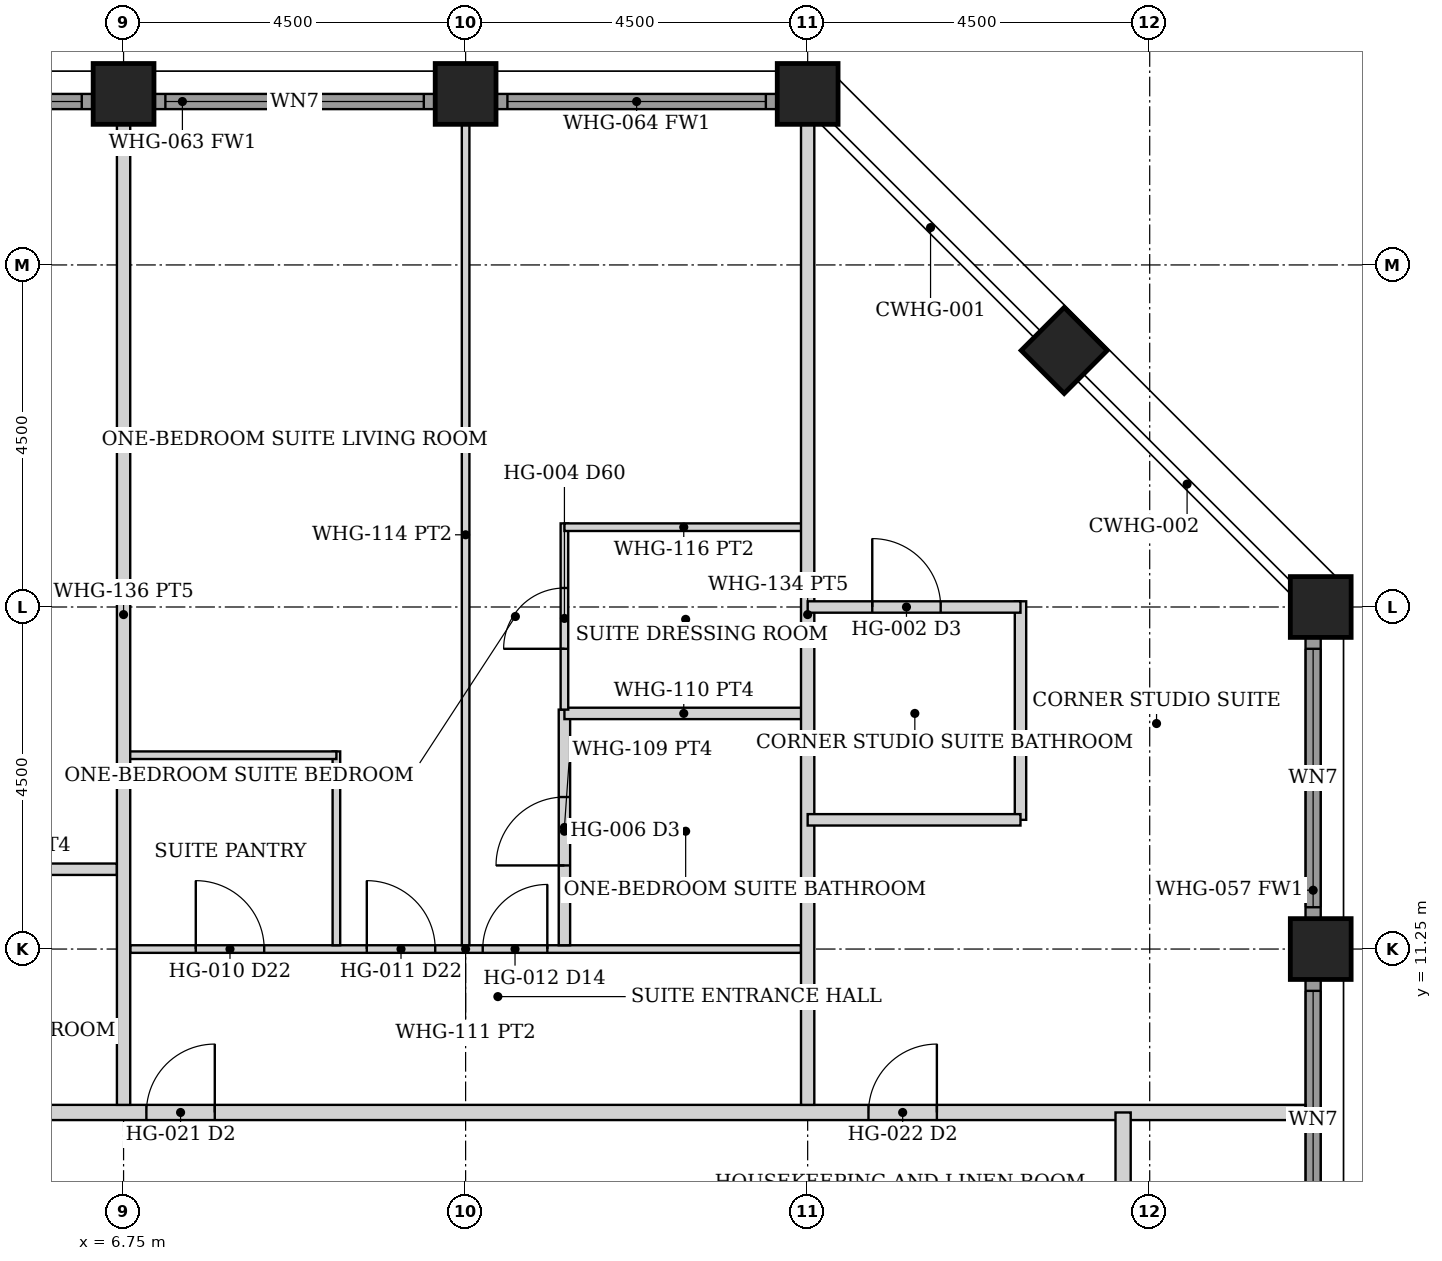
"""IFC4 building model, lengths in metres.
Left out: names, types, materials, properties, quantities, classifications, styles, units other than length and angle.
Written with IfcOpenShell. Run it as: python <this file> out.ifc"""

import sys

from ifc_helpers import new_model, si_unit, direction, frame, frame_2d, origin, origin_2d, place, context, subcontext, project, spatial, rectangle, hollow_rectangle, extrude, element, fill, save


model = new_model("IFC4")
c1 = context("Model", 3, precision=1e-05, world=origin(), true_north=direction((0.0, 1.0)))
c2 = subcontext(c1, "Body", "Model", "MODEL_VIEW")
j1 = project(units=[si_unit("LENGTHUNIT", "METRE"), si_unit("PLANEANGLEUNIT", "RADIAN")], contexts=[c1])
p1 = place(None, origin())
s1 = spatial("IfcSite", under=j1, at=p1, CompositionType="ELEMENT")
p2 = place(p1, origin())
s2 = spatial("IfcBuilding", under=s1, at=p2, CompositionType="ELEMENT")
p3 = place(p2, frame((0.0, 0.0, 186.8)))
s3 = spatial("IfcBuildingStorey", under=s2, at=p3, CompositionType="ELEMENT", Elevation=186.8)
for number, where, z_axis, x_axis in (
    (1, (6.75, 22.5, 0.0), (0.0, 0.0, 1.0), (0.0, 1.0, 0.0)),
    (2, (11.25, 22.5, 0.0), (0.0, 0.0, 1.0), (0.0, 1.0, 0.0)),
    (3, (22.5, 11.25, 0.0), (0.0, 0.0, 1.0), (1.0, 0.0, 0.0)),
    (4, (15.75, 22.5, 0.0), (0.0, 0.0, 1.0), (0.0, 1.0, 0.0)),
    (5, (22.5, 15.75, 0.0), (0.0, 0.0, 1.0), (1.0, 0.0, 0.0)),
    (6, (19.125, 19.125, 0.0), (0.0, 0.0, 1.0), (0.707, 0.707, 0.0)),
):
    element("IfcColumn", number, at=place(p3, frame(where, z_axis=z_axis, x_axis=x_axis)), inside=s3, PredefinedType="COLUMN", context=c2, shape_type="SweptSolid", body=[
        extrude(hollow_rectangle(XDim=0.8, YDim=0.8, WallThickness=0.045, at=origin_2d()), origin(), (0.0, 0.0, 1.0), 3.6),
    ])
p4 = place(p3, frame((22.4, 7.155, 0.0), z_axis=(0.0, 0.0, 1.0), x_axis=(0.0, 1.0, 0.0)))
e7 = element("IfcWall", 7, at=p4, inside=s3, PredefinedType="SOLIDWALL", context=c2, shape_type="SweptSolid", body=[
    extrude(rectangle(XDim=3.69, YDim=0.2, at=frame_2d((1.845, 0.0))), origin(), (0.0, 0.0, 1.0), 2.379),
])
p5 = place(p4, frame((0.145, 0.0, 0.3)))
e8 = element("IfcOpeningElement", 8, at=p5, cuts=e7, PredefinedType="OPENING", context=c2, shape_type="SweptSolid", body=[
    extrude(rectangle(XDim=3.4, YDim=1.929, at=frame_2d((1.7, 0.964))), frame((0.0, 0.11, 0.0), z_axis=(0.0, -1.0, 0.0), x_axis=(1.0, 0.0, 0.0)), (0.0, 0.0, 1.0), 0.22),
])
p6 = place(p3, frame((22.4, 11.655, 0.0), z_axis=(0.0, 0.0, 1.0), x_axis=(0.0, 1.0, 0.0)))
e9 = element("IfcWall", 9, at=p6, inside=s3, PredefinedType="SOLIDWALL", context=c2, shape_type="SweptSolid", body=[
    extrude(rectangle(XDim=3.69, YDim=0.2, at=frame_2d((1.845, 0.0))), origin(), (0.0, 0.0, 1.0), 2.379),
])
p7 = place(p6, frame((0.145, 0.0, 0.3)))
e10 = element("IfcOpeningElement", 10, at=p7, cuts=e9, PredefinedType="OPENING", context=c2, shape_type="SweptSolid", body=[
    extrude(rectangle(XDim=3.4, YDim=1.929, at=frame_2d((1.7, 0.964))), frame((0.0, 0.11, 0.0), z_axis=(0.0, -1.0, 0.0), x_axis=(1.0, 0.0, 0.0)), (0.0, 0.0, 1.0), 0.22),
])
p8 = place(p3, frame((2.655, 22.4, 0.0), z_axis=(0.0, 0.0, 1.0), x_axis=(1.0, 0.0, 0.0)))
e11 = element("IfcWall", 11, at=p8, inside=s3, PredefinedType="SOLIDWALL", context=c2, shape_type="SweptSolid", body=[
    extrude(rectangle(XDim=3.69, YDim=0.2, at=frame_2d((1.845, 0.0))), origin(), (0.0, 0.0, 1.0), 2.379),
])
p9 = place(p8, frame((0.145, 0.0, 0.3)))
e12 = element("IfcOpeningElement", 12, at=p9, cuts=e11, PredefinedType="OPENING", context=c2, shape_type="SweptSolid", body=[
    extrude(rectangle(XDim=3.4, YDim=1.929, at=frame_2d((1.7, 0.964))), frame((0.0, 0.11, 0.0), z_axis=(0.0, -1.0, 0.0), x_axis=(1.0, 0.0, 0.0)), (0.0, 0.0, 1.0), 0.22),
])
p10 = place(p3, frame((7.155, 22.4, 0.0), z_axis=(0.0, 0.0, 1.0), x_axis=(1.0, 0.0, 0.0)))
e13 = element("IfcWall", 13, at=p10, inside=s3, PredefinedType="SOLIDWALL", context=c2, shape_type="SweptSolid", body=[
    extrude(rectangle(XDim=3.69, YDim=0.2, at=frame_2d((1.845, 0.0))), origin(), (0.0, 0.0, 1.0), 2.379),
])
p11 = place(p10, frame((0.145, 0.0, 0.3)))
e14 = element("IfcOpeningElement", 14, at=p11, cuts=e13, PredefinedType="OPENING", context=c2, shape_type="SweptSolid", body=[
    extrude(rectangle(XDim=3.4, YDim=1.929, at=frame_2d((1.7, 0.964))), frame((0.0, 0.11, 0.0), z_axis=(0.0, -1.0, 0.0), x_axis=(1.0, 0.0, 0.0)), (0.0, 0.0, 1.0), 0.22),
])
p12 = place(p3, frame((11.655, 22.4, 0.0), z_axis=(0.0, 0.0, 1.0), x_axis=(1.0, 0.0, 0.0)))
e15 = element("IfcWall", 15, at=p12, inside=s3, PredefinedType="SOLIDWALL", context=c2, shape_type="SweptSolid", body=[
    extrude(rectangle(XDim=3.69, YDim=0.2, at=frame_2d((1.845, 0.0))), origin(), (0.0, 0.0, 1.0), 2.379),
])
p13 = place(p12, frame((0.145, 0.0, 0.3)))
e16 = element("IfcOpeningElement", 16, at=p13, cuts=e15, PredefinedType="OPENING", context=c2, shape_type="SweptSolid", body=[
    extrude(rectangle(XDim=3.4, YDim=1.929, at=frame_2d((1.7, 0.964))), frame((0.0, 0.11, 0.0), z_axis=(0.0, -1.0, 0.0), x_axis=(1.0, 0.0, 0.0)), (0.0, 0.0, 1.0), 0.22),
])
p14 = place(p3, frame((-22.3, 9.1, 0.0), z_axis=(0.0, 0.0, 1.0), x_axis=(1.0, 0.0, 0.0)))
e17 = element("IfcWall", 17, at=p14, inside=s3, PredefinedType="PARTITIONING", context=c2, shape_type="SweptSolid", body=[
    extrude(rectangle(XDim=44.6, YDim=0.2, at=frame_2d((22.3, 0.0))), origin(), (0.0, 0.0, 1.0), 2.379),
])
p15 = place(p14, frame((11.35, 0.0, 0.0)))
e18 = element("IfcOpeningElement", 18, at=p15, cuts=e17, PredefinedType="OPENING", context=c2, shape_type="SweptSolid", body=[
    extrude(rectangle(XDim=0.9, YDim=2.1, at=frame_2d((0.45, 1.05))), frame((0.0, 0.11, 0.0), z_axis=(0.0, -1.0, 0.0), x_axis=(1.0, 0.0, 0.0)), (0.0, 0.0, 1.0), 0.22),
])
p16 = place(p14, frame((15.75, 0.0, 0.0)))
e19 = element("IfcOpeningElement", 19, at=p16, cuts=e17, PredefinedType="OPENING", context=c2, shape_type="SweptSolid", body=[
    extrude(rectangle(XDim=0.9, YDim=2.1, at=frame_2d((0.45, 1.05))), frame((0.0, 0.11, 0.0), z_axis=(0.0, -1.0, 0.0), x_axis=(1.0, 0.0, 0.0)), (0.0, 0.0, 1.0), 0.22),
])
p17 = place(p14, frame((23.45, 0.0, 0.0)))
e20 = element("IfcOpeningElement", 20, at=p17, cuts=e17, PredefinedType="OPENING", context=c2, shape_type="SweptSolid", body=[
    extrude(rectangle(XDim=0.9, YDim=2.1, at=frame_2d((0.45, 1.05))), frame((0.0, 0.11, 0.0), z_axis=(0.0, -1.0, 0.0), x_axis=(1.0, 0.0, 0.0)), (0.0, 0.0, 1.0), 0.22),
])
p18 = place(p14, frame((24.75, 0.0, 0.0)))
e21 = element("IfcOpeningElement", 21, at=p18, cuts=e17, PredefinedType="OPENING", context=c2, shape_type="SweptSolid", body=[
    extrude(rectangle(XDim=0.9, YDim=2.1, at=frame_2d((0.45, 1.05))), frame((0.0, 0.11, 0.0), z_axis=(0.0, -1.0, 0.0), x_axis=(1.0, 0.0, 0.0)), (0.0, 0.0, 1.0), 0.22),
])
p19 = place(p14, frame((29.35, 0.0, 0.0)))
e22 = element("IfcOpeningElement", 22, at=p19, cuts=e17, PredefinedType="OPENING", context=c2, shape_type="SweptSolid", body=[
    extrude(rectangle(XDim=0.9, YDim=2.1, at=frame_2d((0.45, 1.05))), frame((0.0, 0.11, 0.0), z_axis=(0.0, -1.0, 0.0), x_axis=(1.0, 0.0, 0.0)), (0.0, 0.0, 1.0), 0.22),
])
p20 = place(p14, frame((38.85, 0.0, 0.0)))
e23 = element("IfcOpeningElement", 23, at=p20, cuts=e17, PredefinedType="OPENING", context=c2, shape_type="SweptSolid", body=[
    extrude(rectangle(XDim=0.9, YDim=2.1, at=frame_2d((0.45, 1.05))), frame((0.0, 0.11, 0.0), z_axis=(0.0, -1.0, 0.0), x_axis=(1.0, 0.0, 0.0)), (0.0, 0.0, 1.0), 0.22),
])
p21 = place(p14, frame((4.85, 0.0, 0.0)))
e24 = element("IfcOpeningElement", 24, at=p21, cuts=e17, PredefinedType="OPENING", context=c2, shape_type="SweptSolid", body=[
    extrude(rectangle(XDim=0.9, YDim=2.1, at=frame_2d((0.45, 1.05))), frame((0.0, 0.11, 0.0), z_axis=(0.0, -1.0, 0.0), x_axis=(1.0, 0.0, 0.0)), (0.0, 0.0, 1.0), 0.22),
])
p22 = place(p3, frame((19.9, 2.2, 0.0), z_axis=(0.0, 0.0, 1.0), x_axis=(0.0, 1.0, 0.0)))
e25 = element("IfcWall", 25, at=p22, inside=s3, PredefinedType="PARTITIONING", context=c2, shape_type="SweptSolid", body=[
    extrude(rectangle(XDim=6.9, YDim=0.2, at=frame_2d((3.45, 0.0))), origin(), (0.0, 0.0, 1.0), 2.379),
])
p23 = place(p22, frame((2.75, 0.0, 0.0)))
e26 = element("IfcOpeningElement", 26, at=p23, cuts=e25, PredefinedType="OPENING", context=c2, shape_type="SweptSolid", body=[
    extrude(rectangle(XDim=1.35, YDim=2.1, at=frame_2d((0.675, 1.05))), frame((0.0, 0.11, 0.0), z_axis=(0.0, -1.0, 0.0), x_axis=(1.0, 0.0, 0.0)), (0.0, 0.0, 1.0), 0.22),
])
p24 = place(p3, frame((3.6, 12.3, 0.0), z_axis=(0.0, 0.0, 1.0), x_axis=(1.0, 0.0, 0.0)))
e27 = element("IfcWall", 27, at=p24, inside=s3, PredefinedType="PARTITIONING", context=c2, shape_type="SweptSolid", body=[
    extrude(rectangle(XDim=3.062, YDim=0.15, at=frame_2d((1.531, 0.0))), origin(), (0.0, 0.0, 1.0), 2.379),
])
p25 = place(p3, frame((6.837, 11.25, 0.0), z_axis=(0.0, 0.0, 1.0), x_axis=(1.0, 0.0, 0.0)))
e28 = element("IfcWall", 28, at=p25, inside=s3, PredefinedType="PARTITIONING", context=c2, shape_type="SweptSolid", body=[
    extrude(rectangle(XDim=8.825, YDim=0.1, at=frame_2d((4.413, 0.0))), origin(), (0.0, 0.0, 1.0), 2.379),
])
p26 = place(p25, frame((0.863, 0.0, 0.0)))
e29 = element("IfcOpeningElement", 29, at=p26, cuts=e28, PredefinedType="OPENING", context=c2, shape_type="SweptSolid", body=[
    extrude(rectangle(XDim=0.9, YDim=2.1, at=frame_2d((0.45, 1.05))), frame((0.0, 0.06, 0.0), z_axis=(0.0, -1.0, 0.0), x_axis=(1.0, 0.0, 0.0)), (0.0, 0.0, 1.0), 0.12),
])
p27 = place(p25, frame((3.113, 0.0, 0.0)))
e30 = element("IfcOpeningElement", 30, at=p27, cuts=e28, PredefinedType="OPENING", context=c2, shape_type="SweptSolid", body=[
    extrude(rectangle(XDim=0.9, YDim=2.1, at=frame_2d((0.45, 1.05))), frame((0.0, 0.06, 0.0), z_axis=(0.0, -1.0, 0.0), x_axis=(1.0, 0.0, 0.0)), (0.0, 0.0, 1.0), 0.12),
])
p28 = place(p25, frame((4.637, 0.0, 0.0)))
e31 = element("IfcOpeningElement", 31, at=p28, cuts=e28, PredefinedType="OPENING", context=c2, shape_type="SweptSolid", body=[
    extrude(rectangle(XDim=0.85, YDim=2.1, at=frame_2d((0.425, 1.05))), frame((0.0, 0.06, 0.0), z_axis=(0.0, -1.0, 0.0), x_axis=(1.0, 0.0, 0.0)), (0.0, 0.0, 1.0), 0.12),
])
p29 = place(p3, frame((9.55, 11.3, 0.0), z_axis=(0.0, 0.0, 1.0), x_axis=(0.0, 1.0, 0.0)))
e32 = element("IfcWall", 32, at=p29, inside=s3, PredefinedType="PARTITIONING", context=c2, shape_type="SweptSolid", body=[
    extrude(rectangle(XDim=2.55, YDim=0.1, at=frame_2d((1.275, 0.0))), origin(), (0.0, 0.0, 1.0), 2.379),
])
p30 = place(p3, frame((6.81, 13.8, 0.0), z_axis=(0.0, 0.0, 1.0), x_axis=(1.0, 0.0, 0.0)))
e33 = element("IfcWall", 33, at=p30, inside=s3, PredefinedType="PARTITIONING", context=c2, shape_type="SweptSolid", body=[
    extrude(rectangle(XDim=2.74, YDim=0.1, at=frame_2d((1.37, 0.0))), origin(), (0.0, 0.0, 1.0), 2.379),
])
p31 = place(p3, frame((11.25, 11.3, 0.0), z_axis=(0.0, 0.0, 1.0), x_axis=(0.0, 1.0, 0.0)))
e34 = element("IfcWall", 34, at=p31, inside=s3, PredefinedType="PARTITIONING", context=c2, shape_type="SweptSolid", body=[
    extrude(rectangle(XDim=10.8, YDim=0.1, at=frame_2d((5.4, 0.0))), origin(), (0.0, 0.0, 1.0), 2.379),
])
p32 = place(p3, frame((12.55, 11.3, 0.0), z_axis=(0.0, 0.0, 1.0), x_axis=(0.0, 1.0, 0.0)))
e35 = element("IfcWall", 35, at=p32, inside=s3, PredefinedType="PARTITIONING", context=c2, shape_type="SweptSolid", body=[
    extrude(rectangle(XDim=3.1, YDim=0.15, at=frame_2d((1.55, 0.0))), origin(), (0.0, 0.0, 1.0), 2.379),
])
p33 = place(p32, frame((1.05, 0.0, 0.0)))
e36 = element("IfcOpeningElement", 36, at=p33, cuts=e35, PredefinedType="OPENING", context=c2, shape_type="SweptSolid", body=[
    extrude(rectangle(XDim=0.9, YDim=2.1, at=frame_2d((0.45, 1.05))), frame((0.0, 0.085, 0.0), z_axis=(0.0, -1.0, 0.0), x_axis=(1.0, 0.0, 0.0)), (0.0, 0.0, 1.0), 0.17),
])
p34 = place(p3, frame((12.55, 14.35, 0.0), z_axis=(0.0, 0.0, 1.0), x_axis=(1.0, 0.0, 0.0)))
e37 = element("IfcWall", 37, at=p34, inside=s3, PredefinedType="PARTITIONING", context=c2, shape_type="SweptSolid", body=[
    extrude(rectangle(XDim=3.14, YDim=0.15, at=frame_2d((1.57, 0.0))), origin(), (0.0, 0.0, 1.0), 2.379),
])
p35 = place(p3, frame((12.55, 14.4, 0.0), z_axis=(0.0, 0.0, 1.0), x_axis=(0.0, 1.0, 0.0)))
e38 = element("IfcWall", 38, at=p35, inside=s3, PredefinedType="PARTITIONING", context=c2, shape_type="SweptSolid", body=[
    extrude(rectangle(XDim=2.45, YDim=0.1, at=frame_2d((1.225, 0.0))), origin(), (0.0, 0.0, 1.0), 2.379),
])
p36 = place(p35, frame((0.8, 0.0, 0.0)))
e39 = element("IfcOpeningElement", 39, at=p36, cuts=e38, PredefinedType="OPENING", context=c2, shape_type="SweptSolid", body=[
    extrude(rectangle(XDim=0.8, YDim=2.1, at=frame_2d((0.4, 1.05))), frame((0.0, 0.06, 0.0), z_axis=(0.0, -1.0, 0.0), x_axis=(1.0, 0.0, 0.0)), (0.0, 0.0, 1.0), 0.12),
])
p37 = place(p3, frame((12.55, 16.8, 0.0), z_axis=(0.0, 0.0, 1.0), x_axis=(1.0, 0.0, 0.0)))
e40 = element("IfcWall", 40, at=p37, inside=s3, PredefinedType="PARTITIONING", context=c2, shape_type="SweptSolid", body=[
    extrude(rectangle(XDim=3.14, YDim=0.1, at=frame_2d((1.57, 0.0))), origin(), (0.0, 0.0, 1.0), 2.379),
])
for number, where, z_axis, x_axis in (
    (41, (6.75, 9.2, 0.0), (0.0, 0.0, 1.0), (0.0, 1.0, 0.0)),
    (42, (15.75, 9.2, 0.0), (0.0, 0.0, 1.0), (0.0, 1.0, 0.0)),
):
    element("IfcWall", number, at=place(p3, frame(where, z_axis=z_axis, x_axis=x_axis)), inside=s3, PredefinedType="PARTITIONING", context=c2, shape_type="SweptSolid", body=[
        extrude(rectangle(XDim=12.9, YDim=0.175, at=frame_2d((6.45, 0.0))), origin(), (0.0, 0.0, 1.0), 2.379),
    ])
p38 = place(p3, frame((18.55, 12.95, 0.0), z_axis=(0.0, 0.0, 1.0), x_axis=(0.0, 1.0, 0.0)))
e43 = element("IfcWall", 43, at=p38, inside=s3, PredefinedType="PARTITIONING", context=c2, shape_type="SweptSolid", body=[
    extrude(rectangle(XDim=2.875, YDim=0.15, at=frame_2d((1.438, 0.0))), origin(), (0.0, 0.0, 1.0), 2.379),
])
p39 = place(p3, frame((15.75, 12.95, 0.0), z_axis=(0.0, 0.0, 1.0), x_axis=(1.0, 0.0, 0.0)))
e44 = element("IfcWall", 44, at=p39, inside=s3, PredefinedType="PARTITIONING", context=c2, shape_type="SweptSolid", body=[
    extrude(rectangle(XDim=2.8, YDim=0.15, at=frame_2d((1.4, 0.0))), origin(), (0.0, 0.0, 1.0), 2.379),
])
p40 = place(p3, frame((15.75, 15.75, 0.0), z_axis=(0.0, 0.0, 1.0), x_axis=(1.0, 0.0, 0.0)))
e45 = element("IfcWall", 45, at=p40, inside=s3, PredefinedType="PARTITIONING", context=c2, shape_type="SweptSolid", body=[
    extrude(rectangle(XDim=2.8, YDim=0.15, at=frame_2d((1.4, 0.0))), origin(), (0.0, 0.0, 1.0), 2.379),
])
p41 = place(p40, frame((0.85, 0.0, 0.0)))
e46 = element("IfcOpeningElement", 46, at=p41, cuts=e45, PredefinedType="OPENING", context=c2, shape_type="SweptSolid", body=[
    extrude(rectangle(XDim=0.9, YDim=2.1, at=frame_2d((0.45, 1.05))), frame((0.0, 0.085, 0.0), z_axis=(0.0, -1.0, 0.0), x_axis=(1.0, 0.0, 0.0)), (0.0, 0.0, 1.0), 0.17),
])
p42 = place(p5, origin())
e47 = element("IfcWindow", 47, at=p42, inside=s3, PartitioningType="SINGLE_PANEL", PredefinedType="WINDOW", context=c2, shape_type="SweptSolid", body=[
    extrude(rectangle(XDim=3.4, YDim=1.929, at=frame_2d((1.7, 0.964))), frame((0.0, 0.03, 0.0), z_axis=(0.0, -1.0, 0.0), x_axis=(1.0, 0.0, 0.0)), (0.0, 0.0, 1.0), 0.06),
])
fill(e8, e47)
p43 = place(p7, origin())
e48 = element("IfcWindow", 48, at=p43, inside=s3, PartitioningType="SINGLE_PANEL", PredefinedType="WINDOW", context=c2, shape_type="SweptSolid", body=[
    extrude(rectangle(XDim=3.4, YDim=1.929, at=frame_2d((1.7, 0.964))), frame((0.0, 0.03, 0.0), z_axis=(0.0, -1.0, 0.0), x_axis=(1.0, 0.0, 0.0)), (0.0, 0.0, 1.0), 0.06),
])
fill(e10, e48)
p44 = place(p9, origin())
e49 = element("IfcWindow", 49, at=p44, inside=s3, PartitioningType="SINGLE_PANEL", PredefinedType="WINDOW", context=c2, shape_type="SweptSolid", body=[
    extrude(rectangle(XDim=3.4, YDim=1.929, at=frame_2d((1.7, 0.964))), frame((0.0, 0.03, 0.0), z_axis=(0.0, -1.0, 0.0), x_axis=(1.0, 0.0, 0.0)), (0.0, 0.0, 1.0), 0.06),
])
fill(e12, e49)
p45 = place(p11, origin())
e50 = element("IfcWindow", 50, at=p45, inside=s3, PartitioningType="SINGLE_PANEL", PredefinedType="WINDOW", context=c2, shape_type="SweptSolid", body=[
    extrude(rectangle(XDim=3.4, YDim=1.929, at=frame_2d((1.7, 0.964))), frame((0.0, 0.03, 0.0), z_axis=(0.0, -1.0, 0.0), x_axis=(1.0, 0.0, 0.0)), (0.0, 0.0, 1.0), 0.06),
])
fill(e14, e50)
p46 = place(p13, origin())
e51 = element("IfcWindow", 51, at=p46, inside=s3, PartitioningType="SINGLE_PANEL", PredefinedType="WINDOW", context=c2, shape_type="SweptSolid", body=[
    extrude(rectangle(XDim=3.4, YDim=1.929, at=frame_2d((1.7, 0.964))), frame((0.0, 0.03, 0.0), z_axis=(0.0, -1.0, 0.0), x_axis=(1.0, 0.0, 0.0)), (0.0, 0.0, 1.0), 0.06),
])
fill(e16, e51)
p47 = place(p19, origin())
e52 = element("IfcDoor", 52, at=p47, inside=s3, OperationType="SINGLE_SWING_RIGHT", PredefinedType="DOOR", context=c2, shape_type="SweptSolid", body=[
    extrude(rectangle(XDim=0.9, YDim=2.1, at=frame_2d((0.45, 1.05))), frame((0.0, 0.025, 0.0), z_axis=(0.0, -1.0, 0.0), x_axis=(1.0, 0.0, 0.0)), (0.0, 0.0, 1.0), 0.05),
])
fill(e22, e52)
p48 = place(p26, origin())
e53 = element("IfcDoor", 53, at=p48, inside=s3, OperationType="SINGLE_SWING_LEFT", PredefinedType="DOOR", context=c2, shape_type="SweptSolid", body=[
    extrude(rectangle(XDim=0.9, YDim=2.1, at=frame_2d((0.45, 1.05))), frame((0.0, 0.025, 0.0), z_axis=(0.0, -1.0, 0.0), x_axis=(1.0, 0.0, 0.0)), (0.0, 0.0, 1.0), 0.05),
])
fill(e29, e53)
p49 = place(p27, origin())
e54 = element("IfcDoor", 54, at=p49, inside=s3, OperationType="SINGLE_SWING_LEFT", PredefinedType="DOOR", context=c2, shape_type="SweptSolid", body=[
    extrude(rectangle(XDim=0.9, YDim=2.1, at=frame_2d((0.45, 1.05))), frame((0.0, 0.025, 0.0), z_axis=(0.0, -1.0, 0.0), x_axis=(1.0, 0.0, 0.0)), (0.0, 0.0, 1.0), 0.05),
])
fill(e30, e54)
p50 = place(p28, origin())
e55 = element("IfcDoor", 55, at=p50, inside=s3, OperationType="SINGLE_SWING_RIGHT", PredefinedType="DOOR", context=c2, shape_type="SweptSolid", body=[
    extrude(rectangle(XDim=0.85, YDim=2.1, at=frame_2d((0.425, 1.05))), frame((0.0, 0.025, 0.0), z_axis=(0.0, -1.0, 0.0), x_axis=(1.0, 0.0, 0.0)), (0.0, 0.0, 1.0), 0.05),
])
fill(e31, e55)
p51 = place(p33, origin())
e56 = element("IfcDoor", 56, at=p51, inside=s3, OperationType="SINGLE_SWING_LEFT", PredefinedType="DOOR", context=c2, shape_type="SweptSolid", body=[
    extrude(rectangle(XDim=0.9, YDim=2.1, at=frame_2d((0.45, 1.05))), frame((0.0, 0.025, 0.0), z_axis=(0.0, -1.0, 0.0), x_axis=(1.0, 0.0, 0.0)), (0.0, 0.0, 1.0), 0.05),
])
fill(e36, e56)
p52 = place(p36, origin())
e57 = element("IfcDoor", 57, at=p52, inside=s3, OperationType="SINGLE_SWING_LEFT", PredefinedType="DOOR", context=c2, shape_type="SweptSolid", body=[
    extrude(rectangle(XDim=0.8, YDim=2.1, at=frame_2d((0.4, 1.05))), frame((0.0, 0.025, 0.0), z_axis=(0.0, -1.0, 0.0), x_axis=(1.0, 0.0, 0.0)), (0.0, 0.0, 1.0), 0.05),
])
fill(e39, e57)
p53 = place(p20, origin())
e58 = element("IfcDoor", 58, at=p53, inside=s3, OperationType="SINGLE_SWING_RIGHT", PredefinedType="DOOR", context=c2, shape_type="SweptSolid", body=[
    extrude(rectangle(XDim=0.9, YDim=2.1, at=frame_2d((0.45, 1.05))), frame((0.0, 0.025, 0.0), z_axis=(0.0, -1.0, 0.0), x_axis=(1.0, 0.0, 0.0)), (0.0, 0.0, 1.0), 0.05),
])
fill(e23, e58)
p54 = place(p41, origin())
e59 = element("IfcDoor", 59, at=p54, inside=s3, OperationType="SINGLE_SWING_LEFT", PredefinedType="DOOR", context=c2, shape_type="SweptSolid", body=[
    extrude(rectangle(XDim=0.9, YDim=2.1, at=frame_2d((0.45, 1.05))), frame((0.0, 0.025, 0.0), z_axis=(0.0, -1.0, 0.0), x_axis=(1.0, 0.0, 0.0)), (0.0, 0.0, 1.0), 0.05),
])
fill(e46, e59)
save(model, sys.argv[1])
